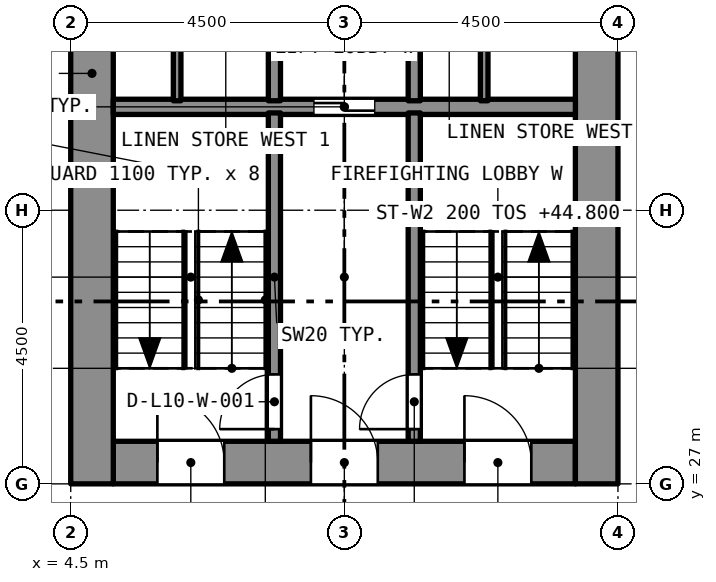
"""IFC4 building model, lengths in metres.
Left out: names, types, materials, properties, quantities, classifications, styles, units other than length and angle.
Written with IfcOpenShell. Run it as: python <this file> out.ifc"""

import sys

from ifc_helpers import new_model, si_unit, direction, frame, frame_2d, origin, place, context, subcontext, project, spatial, rectangle, extrude, element, fill, save


model = new_model("IFC4")
c1 = context("Model", 3, precision=1e-05, world=origin(), true_north=direction((0.0, 1.0)))
c2 = subcontext(c1, "Body", "Model", "MODEL_VIEW")
j1 = project(units=[si_unit("LENGTHUNIT", "METRE"), si_unit("PLANEANGLEUNIT", "RADIAN")], contexts=[c1])
p1 = place(None, origin())
s1 = spatial("IfcSite", under=j1, at=p1, CompositionType="ELEMENT")
p2 = place(p1, origin())
s2 = spatial("IfcBuilding", under=s1, at=p2, CompositionType="ELEMENT")
p3 = place(p2, frame((0.0, 0.0, 43.2)))
s3 = spatial("IfcBuildingStorey", under=s2, at=p3, CompositionType="ELEMENT", Elevation=43.2)
p4 = place(p3, frame((5.2, 27.35, 0.0), z_axis=(0.0, 0.0, 1.0), x_axis=(1.0, 0.0, 0.0)))
e1 = element("IfcWall", 1, at=p4, inside=s3, PredefinedType="SOLIDWALL", context=c2, shape_type="SweptSolid", body=[
    extrude(rectangle(XDim=7.6, YDim=0.7, at=frame_2d((3.8, 0.0))), origin(), (0.0, 0.0, 1.0), 3.2),
])
p5 = place(p4, frame((0.725, 0.0, 0.0)))
e2 = element("IfcOpeningElement", 2, at=p5, cuts=e1, PredefinedType="OPENING", context=c2, shape_type="SweptSolid", body=[
    extrude(rectangle(XDim=1.1, YDim=2.1, at=frame_2d((0.55, 1.05))), frame((0.0, 0.36, 0.0), z_axis=(0.0, -1.0, 0.0), x_axis=(1.0, 0.0, 0.0)), (0.0, 0.0, 1.0), 0.72),
])
p6 = place(p4, frame((3.25, 0.0, 0.0)))
e3 = element("IfcOpeningElement", 3, at=p6, cuts=e1, PredefinedType="OPENING", context=c2, shape_type="SweptSolid", body=[
    extrude(rectangle(XDim=1.1, YDim=2.1, at=frame_2d((0.55, 1.05))), frame((0.0, 0.36, 0.0), z_axis=(0.0, -1.0, 0.0), x_axis=(1.0, 0.0, 0.0)), (0.0, 0.0, 1.0), 0.72),
])
p7 = place(p4, frame((5.775, 0.0, 0.0)))
e4 = element("IfcOpeningElement", 4, at=p7, cuts=e1, PredefinedType="OPENING", context=c2, shape_type="SweptSolid", body=[
    extrude(rectangle(XDim=1.1, YDim=2.1, at=frame_2d((0.55, 1.05))), frame((0.0, 0.36, 0.0), z_axis=(0.0, -1.0, 0.0), x_axis=(1.0, 0.0, 0.0)), (0.0, 0.0, 1.0), 0.72),
])
p8 = place(p3, frame((4.85, 27.0, 0.0), z_axis=(0.0, 0.0, 1.0), x_axis=(0.0, 1.0, 0.0)))
e5 = element("IfcWall", 5, at=p8, inside=s3, PredefinedType="SOLIDWALL", context=c2, shape_type="SweptSolid", body=[
    extrude(rectangle(XDim=13.5, YDim=0.7, at=frame_2d((6.75, 0.0))), origin(), (0.0, 0.0, 1.0), 3.2),
])
p9 = place(p8, frame((8.95, 0.0, 0.0)))
e6 = element("IfcOpeningElement", 6, at=p9, cuts=e5, PredefinedType="OPENING", context=c2, shape_type="SweptSolid", body=[
    extrude(rectangle(XDim=1.2, YDim=2.1, at=frame_2d((0.6, 1.05))), frame((0.0, 0.36, 0.0), z_axis=(0.0, -1.0, 0.0), x_axis=(1.0, 0.0, 0.0)), (0.0, 0.0, 1.0), 0.72),
])
p10 = place(p3, frame((13.15, 27.0, 0.0), z_axis=(0.0, 0.0, 1.0), x_axis=(0.0, 1.0, 0.0)))
e7 = element("IfcWall", 7, at=p10, inside=s3, PredefinedType="SOLIDWALL", context=c2, shape_type="SweptSolid", body=[
    extrude(rectangle(XDim=13.5, YDim=0.7, at=frame_2d((6.75, 0.0))), origin(), (0.0, 0.0, 1.0), 3.2),
])
p11 = place(p10, frame((11.1, 0.0, 0.0)))
e8 = element("IfcOpeningElement", 8, at=p11, cuts=e7, PredefinedType="OPENING", context=c2, shape_type="SweptSolid", body=[
    extrude(rectangle(XDim=1.1, YDim=2.1, at=frame_2d((0.55, 1.05))), frame((0.0, 0.36, 0.0), z_axis=(0.0, -1.0, 0.0), x_axis=(1.0, 0.0, 0.0)), (0.0, 0.0, 1.0), 0.72),
])
p12 = place(p10, frame((8.95, 0.0, 0.0)))
e9 = element("IfcOpeningElement", 9, at=p12, cuts=e7, PredefinedType="OPENING", context=c2, shape_type="SweptSolid", body=[
    extrude(rectangle(XDim=1.2, YDim=2.1, at=frame_2d((0.6, 1.05))), frame((0.0, 0.36, 0.0), z_axis=(0.0, -1.0, 0.0), x_axis=(1.0, 0.0, 0.0)), (0.0, 0.0, 1.0), 0.72),
])
p13 = place(p3, frame((5.2, 33.2, 0.0), z_axis=(0.0, 0.0, 1.0), x_axis=(1.0, 0.0, 0.0)))
e10 = element("IfcWall", 10, at=p13, inside=s3, PredefinedType="SOLIDWALL", context=c2, shape_type="SweptSolid", body=[
    extrude(rectangle(XDim=7.6, YDim=0.25, at=frame_2d((3.8, 0.0))), origin(), (0.0, 0.0, 1.0), 2.9),
])
p14 = place(p13, frame((3.3, 0.0, 0.0)))
e11 = element("IfcOpeningElement", 11, at=p14, cuts=e10, PredefinedType="OPENING", context=c2, shape_type="SweptSolid", body=[
    extrude(rectangle(XDim=1.0, YDim=2.1, at=frame_2d((0.5, 1.05))), frame((0.0, 0.135, 0.0), z_axis=(0.0, -1.0, 0.0), x_axis=(1.0, 0.0, 0.0)), (0.0, 0.0, 1.0), 0.27),
])
p15 = place(p3, frame((7.85, 27.7, 0.0), z_axis=(0.0, 0.0, 1.0), x_axis=(0.0, 1.0, 0.0)))
e12 = element("IfcWall", 12, at=p15, inside=s3, PredefinedType="SOLIDWALL", context=c2, shape_type="SweptSolid", body=[
    extrude(rectangle(XDim=5.4, YDim=0.2, at=frame_2d((2.7, 0.0))), origin(), (0.0, 0.0, 1.0), 2.9),
])
p16 = place(p15, frame((0.2, 0.0, 0.0)))
e13 = element("IfcOpeningElement", 13, at=p16, cuts=e12, PredefinedType="OPENING", context=c2, shape_type="SweptSolid", body=[
    extrude(rectangle(XDim=0.9, YDim=2.1, at=frame_2d((0.45, 1.05))), frame((0.0, 0.11, 0.0), z_axis=(0.0, -1.0, 0.0), x_axis=(1.0, 0.0, 0.0)), (0.0, 0.0, 1.0), 0.22),
])
p17 = place(p3, frame((10.15, 27.7, 0.0), z_axis=(0.0, 0.0, 1.0), x_axis=(0.0, 1.0, 0.0)))
e14 = element("IfcWall", 14, at=p17, inside=s3, PredefinedType="SOLIDWALL", context=c2, shape_type="SweptSolid", body=[
    extrude(rectangle(XDim=5.4, YDim=0.2, at=frame_2d((2.7, 0.0))), origin(), (0.0, 0.0, 1.0), 2.9),
])
p18 = place(p17, frame((0.2, 0.0, 0.0)))
e15 = element("IfcOpeningElement", 15, at=p18, cuts=e14, PredefinedType="OPENING", context=c2, shape_type="SweptSolid", body=[
    extrude(rectangle(XDim=0.9, YDim=2.1, at=frame_2d((0.45, 1.05))), frame((0.0, 0.11, 0.0), z_axis=(0.0, -1.0, 0.0), x_axis=(1.0, 0.0, 0.0)), (0.0, 0.0, 1.0), 0.22),
])
for number, where, z_axis, x_axis in (
    (16, (7.85, 33.3, 0.0), (0.0, 0.0, 1.0), (0.0, 1.0, 0.0)),
    (17, (10.15, 33.3, 0.0), (0.0, 0.0, 1.0), (0.0, 1.0, 0.0)),
):
    element("IfcWall", number, at=place(p3, frame(where, z_axis=z_axis, x_axis=x_axis)), inside=s3, PredefinedType="SOLIDWALL", context=c2, shape_type="SweptSolid", body=[
        extrude(rectangle(XDim=2.3, YDim=0.2, at=frame_2d((1.15, 0.0))), origin(), (0.0, 0.0, 1.0), 2.9),
    ])
for number, where, z_axis, x_axis in (
    (18, (6.25, 33.3, 0.0), (0.0, 0.0, 1.0), (0.0, 1.0, 0.0)),
    (19, (11.3, 33.3, 0.0), (0.0, 0.0, 1.0), (0.0, 1.0, 0.0)),
):
    element("IfcWall", number, at=place(p3, frame(where, z_axis=z_axis, x_axis=x_axis)), inside=s3, PredefinedType="PARTITIONING", context=c2, shape_type="SweptSolid", body=[
        extrude(rectangle(XDim=2.3, YDim=0.125, at=frame_2d((1.15, 0.0))), origin(), (0.0, 0.0, 1.0), 2.9),
    ])
p19 = place(p16, origin())
e20 = element("IfcDoor", 20, at=p19, inside=s3, OperationType="SINGLE_SWING_LEFT", PredefinedType="DOOR", context=c2, shape_type="SweptSolid", body=[
    extrude(rectangle(XDim=0.9, YDim=2.1, at=frame_2d((0.45, 1.05))), frame((0.0, 0.025, 0.0), z_axis=(0.0, -1.0, 0.0), x_axis=(1.0, 0.0, 0.0)), (0.0, 0.0, 1.0), 0.05),
])
fill(e13, e20)
p20 = place(p18, origin())
e21 = element("IfcDoor", 21, at=p20, inside=s3, OperationType="SINGLE_SWING_LEFT", PredefinedType="DOOR", context=c2, shape_type="SweptSolid", body=[
    extrude(rectangle(XDim=0.9, YDim=2.1, at=frame_2d((0.45, 1.05))), frame((0.0, 0.025, 0.0), z_axis=(0.0, -1.0, 0.0), x_axis=(1.0, 0.0, 0.0)), (0.0, 0.0, 1.0), 0.05),
])
fill(e15, e21)
p21 = place(p14, origin())
e22 = element("IfcDoor", 22, at=p21, inside=s3, OperationType="SLIDING_TO_LEFT", PredefinedType="DOOR", context=c2, shape_type="SweptSolid", body=[
    extrude(rectangle(XDim=1.0, YDim=2.1, at=frame_2d((0.5, 1.05))), frame((0.0, 0.025, 0.0), z_axis=(0.0, -1.0, 0.0), x_axis=(1.0, 0.0, 0.0)), (0.0, 0.0, 1.0), 0.05),
])
fill(e11, e22)
p22 = place(p5, origin())
e23 = element("IfcDoor", 23, at=p22, inside=s3, OperationType="SINGLE_SWING_LEFT", PredefinedType="DOOR", context=c2, shape_type="SweptSolid", body=[
    extrude(rectangle(XDim=1.1, YDim=2.1, at=frame_2d((0.55, 1.05))), frame((0.0, 0.025, 0.0), z_axis=(0.0, -1.0, 0.0), x_axis=(1.0, 0.0, 0.0)), (0.0, 0.0, 1.0), 0.05),
])
fill(e2, e23)
p23 = place(p6, origin())
e24 = element("IfcDoor", 24, at=p23, inside=s3, OperationType="SINGLE_SWING_LEFT", PredefinedType="DOOR", context=c2, shape_type="SweptSolid", body=[
    extrude(rectangle(XDim=1.1, YDim=2.1, at=frame_2d((0.55, 1.05))), frame((0.0, 0.025, 0.0), z_axis=(0.0, -1.0, 0.0), x_axis=(1.0, 0.0, 0.0)), (0.0, 0.0, 1.0), 0.05),
])
fill(e3, e24)
p24 = place(p7, origin())
e25 = element("IfcDoor", 25, at=p24, inside=s3, OperationType="SINGLE_SWING_LEFT", PredefinedType="DOOR", context=c2, shape_type="SweptSolid", body=[
    extrude(rectangle(XDim=1.1, YDim=2.1, at=frame_2d((0.55, 1.05))), frame((0.0, 0.025, 0.0), z_axis=(0.0, -1.0, 0.0), x_axis=(1.0, 0.0, 0.0)), (0.0, 0.0, 1.0), 0.05),
])
fill(e4, e25)
save(model, sys.argv[1])
